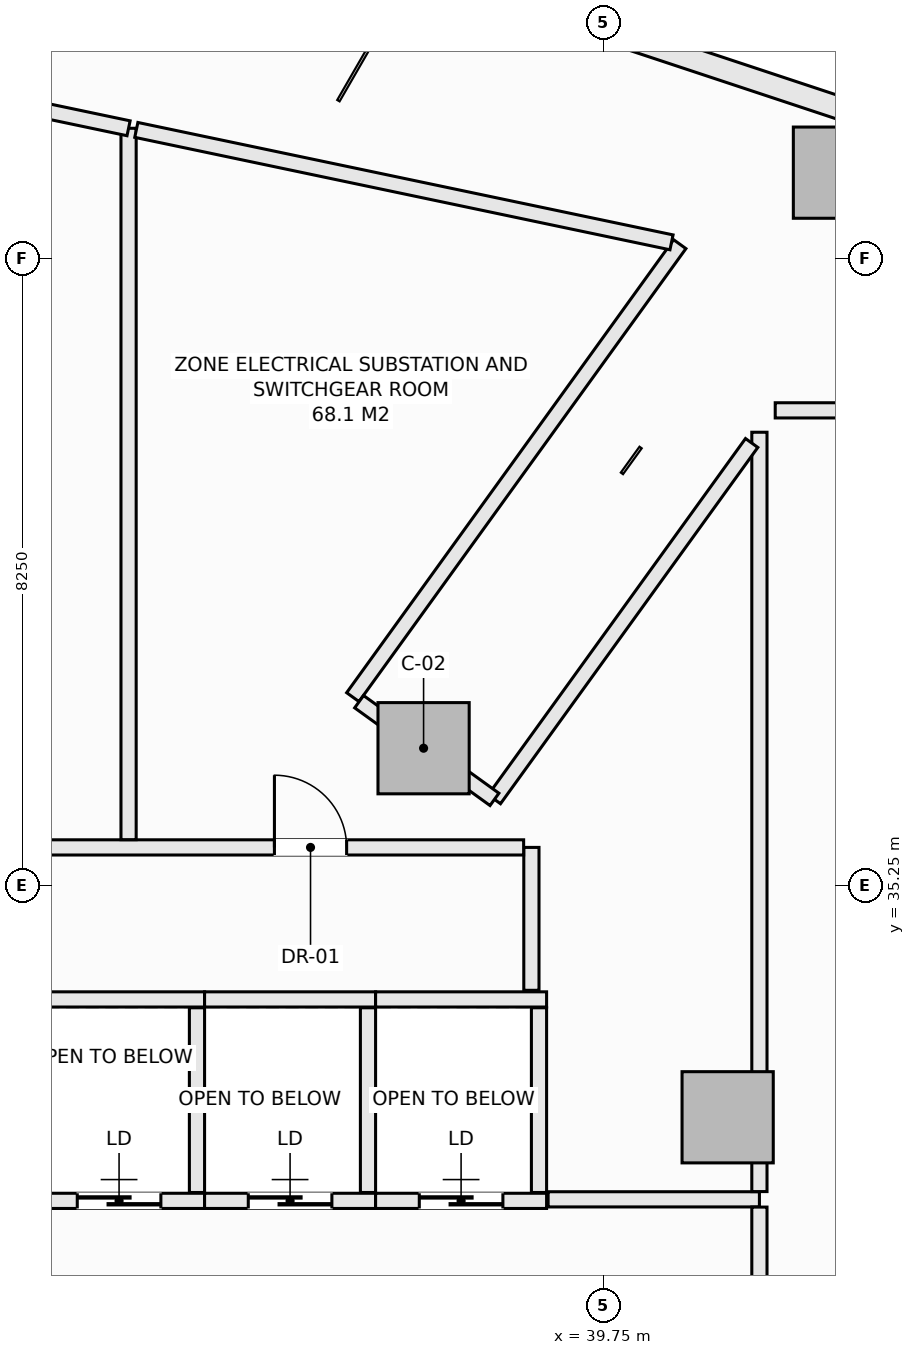
"""IFC4 building model, lengths in metres.
Left out: names, types, materials, properties, quantities, classifications, styles, units other than length and angle.
Written with IfcOpenShell. Run it as: python <this file> out.ifc"""

import sys

from ifc_helpers import new_model, si_unit, direction, frame, frame_2d, origin, origin_2d, place, context, subcontext, project, spatial, rectangle, extrude, element, fill, save


model = new_model("IFC4")
c1 = context("Model", 3, precision=1e-05, world=origin(), true_north=direction((0.0, 1.0)))
c2 = subcontext(c1, "Body", "Model", "MODEL_VIEW")
j1 = project(units=[si_unit("LENGTHUNIT", "METRE"), si_unit("PLANEANGLEUNIT", "RADIAN")], contexts=[c1])
p1 = place(None, origin())
s1 = spatial("IfcSite", under=j1, at=p1, CompositionType="ELEMENT")
p2 = place(p1, origin())
s2 = spatial("IfcBuilding", under=s1, at=p2, CompositionType="ELEMENT")
p3 = place(p2, frame((0.0, 0.0, 95.8)))
s3 = spatial("IfcBuildingStorey", under=s2, at=p3, CompositionType="ELEMENT", Elevation=95.8)
for number, where, z_axis, x_axis in (
    (1, (42.846, 44.627, -0.32), (0.0, 0.0, 1.0), (1.0, 0.0, 0.0)),
    (2, (41.382, 32.199, -0.32), (0.0, 0.0, 1.0), (1.0, 0.0, 0.0)),
    (3, (37.382, 37.055, -0.32), (0.0, 0.0, 1.0), (1.0, 0.0, 0.0)),
):
    element("IfcColumn", number, at=place(p3, frame(where, z_axis=z_axis, x_axis=x_axis)), inside=s3, PredefinedType="COLUMN", context=c2, shape_type="SweptSolid", body=[
        extrude(rectangle(XDim=1.2, YDim=1.2, at=origin_2d()), origin(), (0.0, 0.0, 1.0), 5.04),
    ])
p4 = place(p3, frame((36.968, 47.429, 0.0), z_axis=(0.0, 0.0, 1.0), x_axis=(0.949245153629, -0.314537181127, 0.0)))
e4 = element("IfcWall", 4, at=p4, inside=s3, PredefinedType="SOLIDWALL", context=c2, shape_type="SweptSolid", body=[
    extrude(rectangle(XDim=6.717, YDim=0.3, at=frame_2d((3.358, 0.0))), origin(), (0.0, 0.0, 1.0), 1.15),
])
p5 = place(p3, frame((32.25, 33.75, 0.0), z_axis=(0.0, 0.0, 1.0), x_axis=(1.0, 0.0, 0.0)))
e5 = element("IfcWall", 5, at=p5, inside=s3, PredefinedType="SOLIDWALL", context=c2, shape_type="SweptSolid", body=[
    extrude(rectangle(XDim=2.25, YDim=0.2, at=frame_2d((1.125, 0.0))), origin(), (0.0, 0.0, 1.0), 4.72),
])
p6 = place(p3, frame((32.25, 31.1, 0.0), z_axis=(0.0, 0.0, 1.0), x_axis=(1.0, 0.0, 0.0)))
e6 = element("IfcWall", 6, at=p6, inside=s3, PredefinedType="SOLIDWALL", context=c2, shape_type="SweptSolid", body=[
    extrude(rectangle(XDim=2.25, YDim=0.2, at=frame_2d((1.125, 0.0))), origin(), (0.0, 0.0, 1.0), 4.72),
])
p7 = place(p6, frame((0.575, 0.0, 0.0)))
e7 = element("IfcOpeningElement", 7, at=p7, cuts=e6, PredefinedType="OPENING", context=c2, shape_type="SweptSolid", body=[
    extrude(rectangle(XDim=1.1, YDim=2.2, at=frame_2d((0.55, 1.1))), frame((0.0, 0.11, 0.0), z_axis=(0.0, -1.0, 0.0), x_axis=(1.0, 0.0, 0.0)), (0.0, 0.0, 1.0), 0.22),
])
p8 = place(p3, frame((34.4, 31.21, 0.0), z_axis=(0.0, 0.0, 1.0), x_axis=(0.0, 1.0, 0.0)))
e8 = element("IfcWall", 8, at=p8, inside=s3, PredefinedType="SOLIDWALL", context=c2, shape_type="SweptSolid", body=[
    extrude(rectangle(XDim=2.43, YDim=0.2, at=frame_2d((1.215, 0.0))), origin(), (0.0, 0.0, 1.0), 4.72),
])
p9 = place(p3, frame((34.5, 33.75, 0.0), z_axis=(0.0, 0.0, 1.0), x_axis=(1.0, 0.0, 0.0)))
e9 = element("IfcWall", 9, at=p9, inside=s3, PredefinedType="SOLIDWALL", context=c2, shape_type="SweptSolid", body=[
    extrude(rectangle(XDim=2.25, YDim=0.2, at=frame_2d((1.125, 0.0))), origin(), (0.0, 0.0, 1.0), 4.72),
])
p10 = place(p3, frame((34.5, 31.1, 0.0), z_axis=(0.0, 0.0, 1.0), x_axis=(1.0, 0.0, 0.0)))
e10 = element("IfcWall", 10, at=p10, inside=s3, PredefinedType="SOLIDWALL", context=c2, shape_type="SweptSolid", body=[
    extrude(rectangle(XDim=2.25, YDim=0.2, at=frame_2d((1.125, 0.0))), origin(), (0.0, 0.0, 1.0), 4.72),
])
p11 = place(p10, frame((0.575, 0.0, 0.0)))
e11 = element("IfcOpeningElement", 11, at=p11, cuts=e10, PredefinedType="OPENING", context=c2, shape_type="SweptSolid", body=[
    extrude(rectangle(XDim=1.1, YDim=2.2, at=frame_2d((0.55, 1.1))), frame((0.0, 0.11, 0.0), z_axis=(0.0, -1.0, 0.0), x_axis=(1.0, 0.0, 0.0)), (0.0, 0.0, 1.0), 0.22),
])
p12 = place(p3, frame((36.65, 31.21, 0.0), z_axis=(0.0, 0.0, 1.0), x_axis=(0.0, 1.0, 0.0)))
e12 = element("IfcWall", 12, at=p12, inside=s3, PredefinedType="SOLIDWALL", context=c2, shape_type="SweptSolid", body=[
    extrude(rectangle(XDim=2.43, YDim=0.2, at=frame_2d((1.215, 0.0))), origin(), (0.0, 0.0, 1.0), 4.72),
])
p13 = place(p3, frame((36.75, 33.75, 0.0), z_axis=(0.0, 0.0, 1.0), x_axis=(1.0, 0.0, 0.0)))
e13 = element("IfcWall", 13, at=p13, inside=s3, PredefinedType="SOLIDWALL", context=c2, shape_type="SweptSolid", body=[
    extrude(rectangle(XDim=2.25, YDim=0.2, at=frame_2d((1.125, 0.0))), origin(), (0.0, 0.0, 1.0), 4.72),
])
p14 = place(p3, frame((36.75, 31.1, 0.0), z_axis=(0.0, 0.0, 1.0), x_axis=(1.0, 0.0, 0.0)))
e14 = element("IfcWall", 14, at=p14, inside=s3, PredefinedType="SOLIDWALL", context=c2, shape_type="SweptSolid", body=[
    extrude(rectangle(XDim=2.25, YDim=0.2, at=frame_2d((1.125, 0.0))), origin(), (0.0, 0.0, 1.0), 4.72),
])
p15 = place(p14, frame((0.575, 0.0, 0.0)))
e15 = element("IfcOpeningElement", 15, at=p15, cuts=e14, PredefinedType="OPENING", context=c2, shape_type="SweptSolid", body=[
    extrude(rectangle(XDim=1.1, YDim=2.2, at=frame_2d((0.55, 1.1))), frame((0.0, 0.11, 0.0), z_axis=(0.0, -1.0, 0.0), x_axis=(1.0, 0.0, 0.0)), (0.0, 0.0, 1.0), 0.22),
])
p16 = place(p3, frame((38.9, 31.21, 0.0), z_axis=(0.0, 0.0, 1.0), x_axis=(0.0, 1.0, 0.0)))
e16 = element("IfcWall", 16, at=p16, inside=s3, PredefinedType="SOLIDWALL", context=c2, shape_type="SweptSolid", body=[
    extrude(rectangle(XDim=2.43, YDim=0.2, at=frame_2d((1.215, 0.0))), origin(), (0.0, 0.0, 1.0), 4.72),
])
p17 = place(p3, frame((38.8, 33.87, 0.0), z_axis=(0.0, 0.0, 1.0), x_axis=(0.0, 1.0, 0.0)))
e17 = element("IfcWall", 17, at=p17, inside=s3, PredefinedType="SOLIDWALL", context=c2, shape_type="SweptSolid", body=[
    extrude(rectangle(XDim=1.88, YDim=0.2, at=frame_2d((0.94, 0.0))), origin(), (0.0, 0.0, 1.0), 4.72),
])
p18 = place(p3, frame((29.882, 35.75, 0.0), z_axis=(0.0, 0.0, 1.0), x_axis=(1.0, 0.0, 0.0)))
e18 = element("IfcWall", 18, at=p18, inside=s3, PredefinedType="SOLIDWALL", context=c2, shape_type="SweptSolid", body=[
    extrude(rectangle(XDim=8.816, YDim=0.2, at=frame_2d((4.408, 0.0))), origin(), (0.0, 0.0, 1.0), 4.084),
])
p19 = place(p18, frame((5.537, 0.0, 0.0)))
e19 = element("IfcOpeningElement", 19, at=p19, cuts=e18, PredefinedType="OPENING", context=c2, shape_type="SweptSolid", body=[
    extrude(rectangle(XDim=0.95, YDim=2.1, at=frame_2d((0.475, 1.05))), frame((0.0, 0.11, 0.0), z_axis=(0.0, -1.0, 0.0), x_axis=(1.0, 0.0, 0.0)), (0.0, 0.0, 1.0), 0.22),
])
p20 = place(p18, frame((1.539, 0.0, 0.0)))
e20 = element("IfcOpeningElement", 20, at=p20, cuts=e18, PredefinedType="OPENING", context=c2, shape_type="SweptSolid", body=[
    extrude(rectangle(XDim=0.95, YDim=2.1, at=frame_2d((0.475, 1.05))), frame((0.0, 0.11, 0.0), z_axis=(0.0, -1.0, 0.0), x_axis=(1.0, 0.0, 0.0)), (0.0, 0.0, 1.0), 0.22),
])
p21 = place(p3, frame((39.02, 31.12, 0.0), z_axis=(0.0, 0.0, 1.0), x_axis=(1.0, 0.0, 0.0)))
e21 = element("IfcWall", 21, at=p21, inside=s3, PredefinedType="SOLIDWALL", context=c2, shape_type="SweptSolid", body=[
    extrude(rectangle(XDim=2.78, YDim=0.2, at=frame_2d((1.39, 0.0))), origin(), (0.0, 0.0, 1.0), 4.72),
])
p22 = place(p3, frame((41.8, 12.5, 0.0), z_axis=(0.0, 0.0, 1.0), x_axis=(0.0, 1.0, 0.0)))
e22 = element("IfcWall", 22, at=p22, inside=s3, PredefinedType="SOLIDWALL", context=c2, shape_type="SweptSolid", body=[
    extrude(rectangle(XDim=18.518, YDim=0.2, at=frame_2d((9.259, 0.0))), origin(), (0.0, 0.0, 1.0), 4.084),
])
p23 = place(p22, frame((12.024, 0.0, 0.0)))
e23 = element("IfcOpeningElement", 23, at=p23, cuts=e22, PredefinedType="OPENING", context=c2, shape_type="SweptSolid", body=[
    extrude(rectangle(XDim=1.5, YDim=2.2, at=frame_2d((0.75, 1.1))), frame((0.0, 0.11, 0.0), z_axis=(0.0, -1.0, 0.0), x_axis=(1.0, 0.0, 0.0)), (0.0, 0.0, 1.0), 0.22),
])
p24 = place(p3, frame((41.8, 31.222, 0.0), z_axis=(0.0, 0.0, 1.0), x_axis=(0.0, 1.0, 0.0)))
e24 = element("IfcWall", 24, at=p24, inside=s3, PredefinedType="SOLIDWALL", context=c2, shape_type="SweptSolid", body=[
    extrude(rectangle(XDim=9.99, YDim=0.2, at=frame_2d((4.995, 0.0))), origin(), (0.0, 0.0, 1.0), 4.084),
])
p25 = place(p3, frame((38.312, 36.383, 0.0), z_axis=(0.0, 0.0, 1.0), x_axis=(0.585479763009, 0.810687021672, 0.0)))
e25 = element("IfcWall", 25, at=p25, inside=s3, PredefinedType="SOLIDWALL", context=c2, shape_type="SweptSolid", body=[
    extrude(rectangle(XDim=5.782, YDim=0.2, at=frame_2d((2.891, 0.0))), origin(), (0.0, 0.0, 1.0), 4.72),
])
p26 = place(p3, frame((42.008, 41.5, 0.0), z_axis=(0.0, 0.0, 1.0), x_axis=(1.0, 0.0, 0.0)))
e26 = element("IfcWall", 26, at=p26, inside=s3, PredefinedType="SOLIDWALL", context=c2, shape_type="SweptSolid", body=[
    extrude(rectangle(XDim=2.626, YDim=0.2, at=frame_2d((1.313, 0.0))), origin(), (0.0, 0.0, 1.0), 4.72),
])
p27 = place(p3, frame((36.45, 37.727, 0.0), z_axis=(0.0, 0.0, 1.0), x_axis=(0.585268596804, 0.810839484482, 0.0)))
e27 = element("IfcWall", 27, at=p27, inside=s3, PredefinedType="SOLIDWALL", context=c2, shape_type="SweptSolid", body=[
    extrude(rectangle(XDim=7.35, YDim=0.2, at=frame_2d((3.675, 0.0))), origin(), (0.0, 0.0, 1.0), 4.72),
])
p28 = place(p3, frame((33.5, 35.852, 0.0), z_axis=(0.0, 0.0, 1.0), x_axis=(0.0, 1.0, 0.0)))
e28 = element("IfcWall", 28, at=p28, inside=s3, PredefinedType="SOLIDWALL", context=c2, shape_type="SweptSolid", body=[
    extrude(rectangle(XDim=9.359, YDim=0.2, at=frame_2d((4.679, 0.0))), origin(), (0.0, 0.0, 1.0), 4.72),
])
p29 = place(p3, frame((31.275, 45.678, 0.0), z_axis=(0.0, 0.0, 1.0), x_axis=(0.978630598051, -0.205626244818, 0.0)))
e29 = element("IfcWall", 29, at=p29, inside=s3, PredefinedType="SOLIDWALL", context=c2, shape_type="SweptSolid", body=[
    extrude(rectangle(XDim=2.274, YDim=0.2, at=frame_2d((1.137, 0.0))), origin(), (0.0, 0.0, 1.0), 4.72),
])
p30 = place(p3, frame((33.602, 45.19, 0.0), z_axis=(0.0, 0.0, 1.0), x_axis=(0.978638616513, -0.205588079102, 0.0)))
e30 = element("IfcWall", 30, at=p30, inside=s3, PredefinedType="SOLIDWALL", context=c2, shape_type="SweptSolid", body=[
    extrude(rectangle(XDim=7.195, YDim=0.2, at=frame_2d((3.598, 0.0))), origin(), (0.0, 0.0, 1.0), 4.72),
])
p31 = place(p3, frame((36.533, 37.667, 0.0), z_axis=(0.0, 0.0, 1.0), x_axis=(0.810884383472, -0.585206388072, 0.0)))
e31 = element("IfcWall", 31, at=p31, inside=s3, PredefinedType="SOLIDWALL", context=c2, shape_type="SweptSolid", body=[
    extrude(rectangle(XDim=2.196, YDim=0.2, at=frame_2d((1.098, 0.0))), origin(), (0.0, 0.0, 1.0), 4.084),
])
p32 = place(p7, origin())
e32 = element("IfcDoor", 32, at=p32, inside=s3, OperationType="SLIDING_TO_LEFT", PredefinedType="DOOR", context=c2, shape_type="SweptSolid", body=[
    extrude(rectangle(XDim=1.1, YDim=2.2, at=frame_2d((0.55, 1.1))), frame((0.0, 0.025, 0.0), z_axis=(0.0, -1.0, 0.0), x_axis=(1.0, 0.0, 0.0)), (0.0, 0.0, 1.0), 0.05),
])
fill(e7, e32)
p33 = place(p11, origin())
e33 = element("IfcDoor", 33, at=p33, inside=s3, OperationType="SLIDING_TO_LEFT", PredefinedType="DOOR", context=c2, shape_type="SweptSolid", body=[
    extrude(rectangle(XDim=1.1, YDim=2.2, at=frame_2d((0.55, 1.1))), frame((0.0, 0.025, 0.0), z_axis=(0.0, -1.0, 0.0), x_axis=(1.0, 0.0, 0.0)), (0.0, 0.0, 1.0), 0.05),
])
fill(e11, e33)
p34 = place(p15, origin())
e34 = element("IfcDoor", 34, at=p34, inside=s3, OperationType="SLIDING_TO_LEFT", PredefinedType="DOOR", context=c2, shape_type="SweptSolid", body=[
    extrude(rectangle(XDim=1.1, YDim=2.2, at=frame_2d((0.55, 1.1))), frame((0.0, 0.025, 0.0), z_axis=(0.0, -1.0, 0.0), x_axis=(1.0, 0.0, 0.0)), (0.0, 0.0, 1.0), 0.05),
])
fill(e15, e34)
p35 = place(p19, origin())
e35 = element("IfcDoor", 35, at=p35, inside=s3, OperationType="SINGLE_SWING_LEFT", PredefinedType="DOOR", context=c2, shape_type="SweptSolid", body=[
    extrude(rectangle(XDim=0.95, YDim=2.1, at=frame_2d((0.475, 1.05))), frame((0.0, 0.025, 0.0), z_axis=(0.0, -1.0, 0.0), x_axis=(1.0, 0.0, 0.0)), (0.0, 0.0, 1.0), 0.05),
])
fill(e19, e35)
save(model, sys.argv[1])
